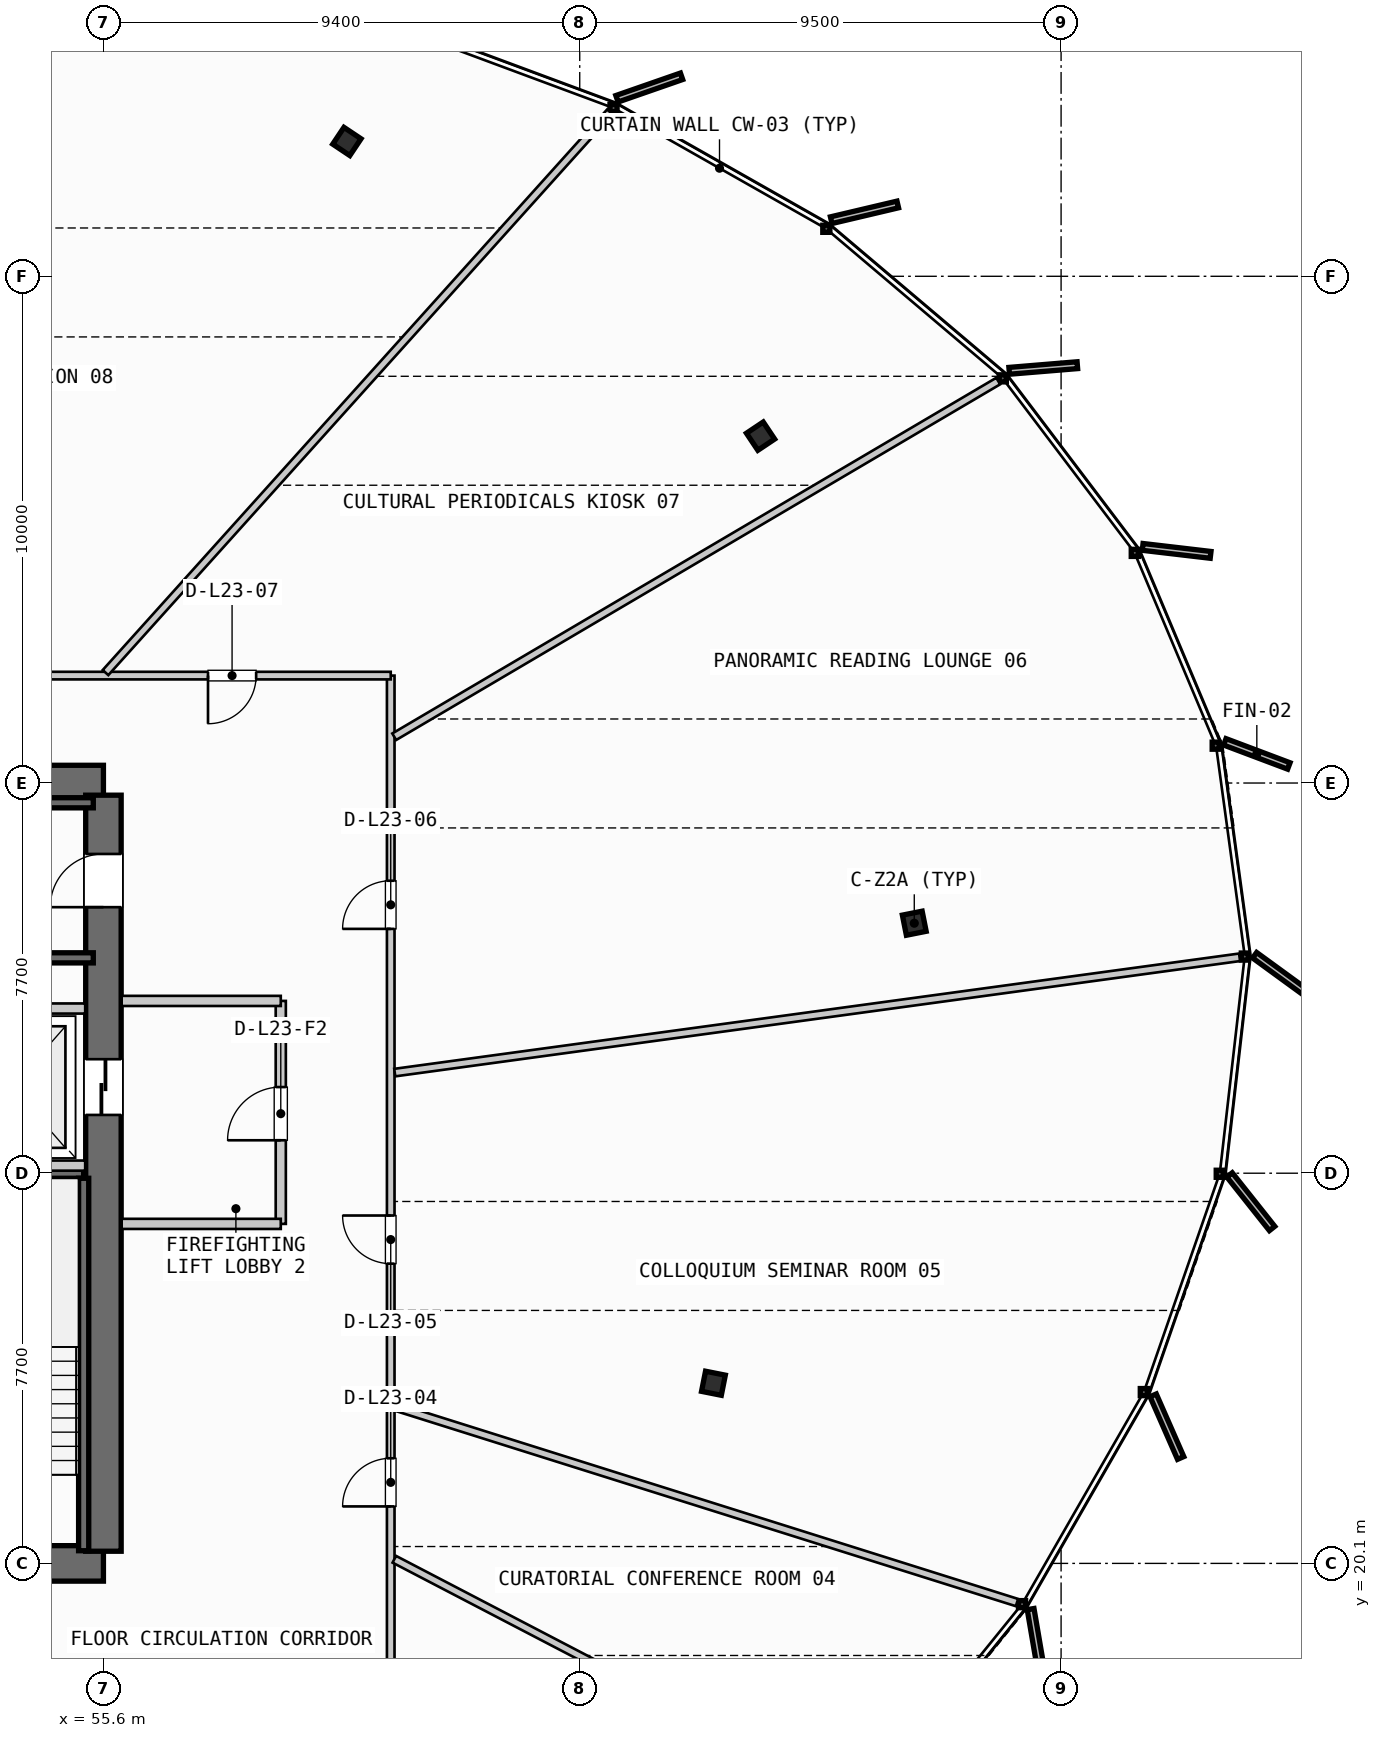
"""IFC4 building model, lengths in metres.
Left out: names, types, materials, properties, quantities, classifications, styles, units other than length and angle.
Written with IfcOpenShell. Run it as: python <this file> out.ifc"""

import sys

from ifc_helpers import new_model, si_unit, direction, frame, frame_2d, origin, origin_2d, place, context, subcontext, project, spatial, rectangle, i_section, extrude, source, transform, mapped, element, fill, save


model = new_model("IFC4")
c1 = context("Model", 3, precision=1e-05, world=origin(), true_north=direction((0.0, 1.0)))
c2 = subcontext(c1, "Body", "Model", "MODEL_VIEW")
j1 = project(units=[si_unit("LENGTHUNIT", "METRE"), si_unit("PLANEANGLEUNIT", "RADIAN")], contexts=[c1])
p1 = place(None, origin())
s1 = spatial("IfcSite", under=j1, at=p1, CompositionType="ELEMENT")
p2 = place(p1, origin())
s2 = spatial("IfcBuilding", under=s1, at=p2, CompositionType="ELEMENT")
p3 = place(p2, frame((0.0, 0.0, 96.4)))
s3 = spatial("IfcBuildingStorey", under=s2, at=p3, CompositionType="ELEMENT", Elevation=96.4)
p4 = place(p3, frame((38.0, 20.1, 0.0), z_axis=(0.0, 0.0, 1.0), x_axis=(1.0, 0.0, 0.0)))
e1 = element("IfcWall", 1, at=p4, inside=s3, PredefinedType="SHEAR", context=c2, shape_type="SweptSolid", body=[
    extrude(rectangle(XDim=17.6, YDim=0.7, at=frame_2d((8.8, 0.0))), origin(), (0.0, 0.0, 1.0), 3.35),
])
p5 = place(p4, frame((1.4, 0.0, 0.0)))
e2 = element("IfcOpeningElement", 2, at=p5, cuts=e1, PredefinedType="OPENING", context=c2, shape_type="SweptSolid", body=[
    extrude(rectangle(XDim=1.05, YDim=2.15, at=frame_2d((0.525, 1.075))), frame((0.0, 0.36, 0.0), z_axis=(0.0, -1.0, 0.0), x_axis=(1.0, 0.0, 0.0)), (0.0, 0.0, 1.0), 0.72),
])
p6 = place(p4, frame((15.15, 0.0, 0.0)))
e3 = element("IfcOpeningElement", 3, at=p6, cuts=e1, PredefinedType="OPENING", context=c2, shape_type="SweptSolid", body=[
    extrude(rectangle(XDim=1.05, YDim=2.15, at=frame_2d((0.525, 1.075))), frame((0.0, 0.36, 0.0), z_axis=(0.0, -1.0, 0.0), x_axis=(1.0, 0.0, 0.0)), (0.0, 0.0, 1.0), 0.72),
])
p7 = place(p3, frame((55.6, 35.5, 0.0), z_axis=(0.0, 0.0, 1.0), x_axis=(-1.0, 0.0, 0.0)))
e4 = element("IfcWall", 4, at=p7, inside=s3, PredefinedType="SHEAR", context=c2, shape_type="SweptSolid", body=[
    extrude(rectangle(XDim=17.6, YDim=0.7, at=frame_2d((8.8, 0.0))), origin(), (0.0, 0.0, 1.0), 3.35),
])
p8 = place(p7, frame((8.05, 0.0, 0.0)))
e5 = element("IfcOpeningElement", 5, at=p8, cuts=e4, PredefinedType="OPENING", context=c2, shape_type="SweptSolid", body=[
    extrude(rectangle(XDim=1.5, YDim=2.2, at=frame_2d((0.75, 1.1))), frame((0.0, 0.36, 0.0), z_axis=(0.0, -1.0, 0.0), x_axis=(1.0, 0.0, 0.0)), (0.0, 0.0, 1.0), 0.72),
])
p9 = place(p7, frame((14.95, 0.0, 0.0)))
e6 = element("IfcOpeningElement", 6, at=p9, cuts=e4, PredefinedType="OPENING", context=c2, shape_type="SweptSolid", body=[
    extrude(rectangle(XDim=1.4, YDim=2.3, at=frame_2d((0.7, 1.15))), frame((0.0, 0.36, 0.0), z_axis=(0.0, -1.0, 0.0), x_axis=(1.0, 0.0, 0.0)), (0.0, 0.0, 1.0), 0.72),
])
p10 = place(p7, frame((12.6, 0.0, 0.0)))
e7 = element("IfcOpeningElement", 7, at=p10, cuts=e4, PredefinedType="OPENING", context=c2, shape_type="SweptSolid", body=[
    extrude(rectangle(XDim=0.95, YDim=2.15, at=frame_2d((0.475, 1.075))), frame((0.0, 0.36, 0.0), z_axis=(0.0, -1.0, 0.0), x_axis=(1.0, 0.0, 0.0)), (0.0, 0.0, 1.0), 0.72),
])
p11 = place(p7, frame((10.45, 0.0, 0.0)))
e8 = element("IfcOpeningElement", 8, at=p11, cuts=e4, PredefinedType="OPENING", context=c2, shape_type="SweptSolid", body=[
    extrude(rectangle(XDim=0.95, YDim=2.15, at=frame_2d((0.475, 1.075))), frame((0.0, 0.36, 0.0), z_axis=(0.0, -1.0, 0.0), x_axis=(1.0, 0.0, 0.0)), (0.0, 0.0, 1.0), 0.72),
])
p12 = place(p3, frame((55.6, 20.34, 0.0), z_axis=(0.0, 0.0, 1.0), x_axis=(0.0, 1.0, 0.0)))
e9 = element("IfcWall", 9, at=p12, inside=s3, PredefinedType="SHEAR", context=c2, shape_type="SweptSolid", body=[
    extrude(rectangle(XDim=14.92, YDim=0.7, at=frame_2d((7.46, 0.0))), origin(), (0.0, 0.0, 1.0), 3.35),
])
p13 = place(p12, frame((12.71, 0.0, 0.0)))
e10 = element("IfcOpeningElement", 10, at=p13, cuts=e9, PredefinedType="OPENING", context=c2, shape_type="SweptSolid", body=[
    extrude(rectangle(XDim=1.05, YDim=2.15, at=frame_2d((0.525, 1.075))), frame((0.0, 0.36, 0.0), z_axis=(0.0, -1.0, 0.0), x_axis=(1.0, 0.0, 0.0)), (0.0, 0.0, 1.0), 0.72),
])
p14 = place(p12, frame((8.61, 0.0, 0.0)))
e11 = element("IfcOpeningElement", 11, at=p14, cuts=e9, PredefinedType="OPENING", context=c2, shape_type="SweptSolid", body=[
    extrude(rectangle(XDim=1.1, YDim=2.2, at=frame_2d((0.55, 1.1))), frame((0.0, 0.36, 0.0), z_axis=(0.0, -1.0, 0.0), x_axis=(1.0, 0.0, 0.0)), (0.0, 0.0, 1.0), 0.72),
])
m1 = source(origin(), c2, "Body", "SweptSolid", [
    extrude(i_section(OverallWidth=0.405, OverallDepth=0.398, WebThickness=0.035, FlangeThickness=0.056, FilletRadius=0.015, at=origin_2d()), origin(), (0.0, 0.0, 1.0), 3.35),
])
for number, where, z_axis, x_axis in (
    (12, (71.603, 32.733, 0.0), (0.0, 0.0, 1.0), (0.981, 0.195, 0.0)),
    (13, (68.569, 42.345, 0.0), (0.0, 0.0, 1.0), (0.831, 0.556, 0.0)),
    (14, (60.405, 48.161, 0.0), (0.0, 0.0, 1.0), (0.556, 0.831, 0.0)),
    (15, (67.639, 23.655, 0.0), (0.0, 0.0, 1.0), (0.981, -0.195, 0.0)),
):
    element("IfcColumn", number, at=place(p3, frame(where, z_axis=z_axis, x_axis=x_axis)), inside=s3, PredefinedType="COLUMN", context=c2, shape_type="MappedRepresentation", body=[
        mapped(m1, transform((0.0, 0.0, 0.0), scale=1.0)),
    ])
p15 = place(p3, frame((52.15, 27.8, 0.0), z_axis=(0.0, 0.0, 1.0), x_axis=(1.0, 0.0, 0.0)))
e16 = element("IfcWall", 16, at=p15, inside=s3, PredefinedType="SHEAR", context=c2, shape_type="SweptSolid", body=[
    extrude(rectangle(XDim=3.06, YDim=0.2, at=frame_2d((1.53, 0.0))), origin(), (0.0, 0.0, 1.0), 3.35),
])
for number, where, z_axis, x_axis in (
    (17, (55.21, 27.7, 0.0), (0.0, 0.0, 1.0), (0.0, -1.0, 0.0)),
    (18, (48.05, 35.11, 0.0), (0.0, 0.0, 1.0), (1.0, 0.0, 0.0)),
    (19, (55.4, 32.05, 0.0), (0.0, 0.0, 1.0), (-1.0, 0.0, 0.0)),
):
    element("IfcWall", number, at=place(p3, frame(where, z_axis=z_axis, x_axis=x_axis)), inside=s3, PredefinedType="SHEAR", context=c2, shape_type="SweptSolid", body=[
        extrude(rectangle(XDim=7.35, YDim=0.2, at=frame_2d((3.675, 0.0))), origin(), (0.0, 0.0, 1.0), 3.35),
    ])
for number, where, z_axis, x_axis in (
    (20, (52.45, 27.95, 0.0), (0.0, 0.0, 1.0), (1.0, 0.0, 0.0)),
    (21, (52.45, 31.05, 0.0), (0.0, 0.0, 1.0), (1.0, 0.0, 0.0)),
):
    element("IfcWall", number, at=place(p3, frame(where, z_axis=z_axis, x_axis=x_axis)), inside=s3, PredefinedType="PARTITIONING", context=c2, shape_type="SweptSolid", body=[
        extrude(rectangle(XDim=2.79, YDim=0.2, at=frame_2d((1.395, 0.0))), origin(), (0.0, 0.0, 1.0), 2.28),
    ])
p16 = place(p3, frame((59.1, 26.8, 0.0), z_axis=(0.0, 0.0, 1.0), x_axis=(0.0, 1.0, 0.0)))
e22 = element("IfcWall", 22, at=p16, inside=s3, PredefinedType="PARTITIONING", context=c2, shape_type="SweptSolid", body=[
    extrude(rectangle(XDim=4.4, YDim=0.2, at=frame_2d((2.2, 0.0))), origin(), (0.0, 0.0, 1.0), 2.28),
])
p17 = place(p16, frame((1.65, 0.0, 0.0)))
e23 = element("IfcOpeningElement", 23, at=p17, cuts=e22, PredefinedType="OPENING", context=c2, shape_type="SweptSolid", body=[
    extrude(rectangle(XDim=1.05, YDim=2.15, at=frame_2d((0.525, 1.075))), frame((0.0, 0.11, 0.0), z_axis=(0.0, -1.0, 0.0), x_axis=(1.0, 0.0, 0.0)), (0.0, 0.0, 1.0), 0.22),
])
for number, where, z_axis, x_axis in (
    (24, (55.96, 26.8, 0.0), (0.0, 0.0, 1.0), (1.0, 0.0, 0.0)),
    (25, (55.96, 31.2, 0.0), (0.0, 0.0, 1.0), (1.0, 0.0, 0.0)),
):
    element("IfcWall", number, at=place(p3, frame(where, z_axis=z_axis, x_axis=x_axis)), inside=s3, PredefinedType="PARTITIONING", context=c2, shape_type="SweptSolid", body=[
        extrude(rectangle(XDim=3.14, YDim=0.2, at=frame_2d((1.57, 0.0))), origin(), (0.0, 0.0, 1.0), 2.28),
    ])
p18 = place(p3, frame((61.27, 17.14, 0.0), z_axis=(0.0, 0.0, 1.0), x_axis=(0.0, 1.0, 0.0)))
e26 = element("IfcWall", 26, at=p18, inside=s3, PredefinedType="PARTITIONING", context=c2, shape_type="SweptSolid", body=[
    extrude(rectangle(XDim=20.48, YDim=0.15, at=frame_2d((10.24, 0.0))), origin(), (0.0, 0.0, 1.0), 2.28),
])
p19 = place(p18, frame((4.084, 0.0, 0.0)))
e27 = element("IfcOpeningElement", 27, at=p19, cuts=e26, PredefinedType="OPENING", context=c2, shape_type="SweptSolid", body=[
    extrude(rectangle(XDim=0.95, YDim=2.15, at=frame_2d((0.475, 1.075))), frame((0.0, 0.085, 0.0), z_axis=(0.0, -1.0, 0.0), x_axis=(1.0, 0.0, 0.0)), (0.0, 0.0, 1.0), 0.17),
])
p20 = place(p18, frame((8.875, 0.0, 0.0)))
e28 = element("IfcOpeningElement", 28, at=p20, cuts=e26, PredefinedType="OPENING", context=c2, shape_type="SweptSolid", body=[
    extrude(rectangle(XDim=0.95, YDim=2.15, at=frame_2d((0.475, 1.075))), frame((0.0, 0.085, 0.0), z_axis=(0.0, -1.0, 0.0), x_axis=(1.0, 0.0, 0.0)), (0.0, 0.0, 1.0), 0.17),
])
p21 = place(p18, frame((15.482, 0.0, 0.0)))
e29 = element("IfcOpeningElement", 29, at=p21, cuts=e26, PredefinedType="OPENING", context=c2, shape_type="SweptSolid", body=[
    extrude(rectangle(XDim=0.95, YDim=2.15, at=frame_2d((0.475, 1.075))), frame((0.0, 0.085, 0.0), z_axis=(0.0, -1.0, 0.0), x_axis=(1.0, 0.0, 0.0)), (0.0, 0.0, 1.0), 0.17),
])
p22 = place(p3, frame((61.27, 37.62, 0.0), z_axis=(0.0, 0.0, 1.0), x_axis=(-1.0, 0.0, 0.0)))
e30 = element("IfcWall", 30, at=p22, inside=s3, PredefinedType="PARTITIONING", context=c2, shape_type="SweptSolid", body=[
    extrude(rectangle(XDim=28.42, YDim=0.15, at=frame_2d((14.21, 0.0))), origin(), (0.0, 0.0, 1.0), 2.28),
])
p23 = place(p22, frame((2.656, 0.0, 0.0)))
e31 = element("IfcOpeningElement", 31, at=p23, cuts=e30, PredefinedType="OPENING", context=c2, shape_type="SweptSolid", body=[
    extrude(rectangle(XDim=0.95, YDim=2.15, at=frame_2d((0.475, 1.075))), frame((0.0, 0.085, 0.0), z_axis=(0.0, -1.0, 0.0), x_axis=(1.0, 0.0, 0.0)), (0.0, 0.0, 1.0), 0.17),
])
p24 = place(p22, frame((9.818, 0.0, 0.0)))
e32 = element("IfcOpeningElement", 32, at=p24, cuts=e30, PredefinedType="OPENING", context=c2, shape_type="SweptSolid", body=[
    extrude(rectangle(XDim=0.95, YDim=2.15, at=frame_2d((0.475, 1.075))), frame((0.0, 0.085, 0.0), z_axis=(0.0, -1.0, 0.0), x_axis=(1.0, 0.0, 0.0)), (0.0, 0.0, 1.0), 0.17),
])
p25 = place(p22, frame((16.826, 0.0, 0.0)))
e33 = element("IfcOpeningElement", 33, at=p25, cuts=e30, PredefinedType="OPENING", context=c2, shape_type="SweptSolid", body=[
    extrude(rectangle(XDim=0.95, YDim=2.15, at=frame_2d((0.475, 1.075))), frame((0.0, 0.085, 0.0), z_axis=(0.0, -1.0, 0.0), x_axis=(1.0, 0.0, 0.0)), (0.0, 0.0, 1.0), 0.17),
])
p26 = place(p22, frame((23.229, 0.0, 0.0)))
e34 = element("IfcOpeningElement", 34, at=p26, cuts=e30, PredefinedType="OPENING", context=c2, shape_type="SweptSolid", body=[
    extrude(rectangle(XDim=0.95, YDim=2.15, at=frame_2d((0.475, 1.075))), frame((0.0, 0.085, 0.0), z_axis=(0.0, -1.0, 0.0), x_axis=(1.0, 0.0, 0.0)), (0.0, 0.0, 1.0), 0.17),
])
p27 = place(p3, frame((61.341, 20.181, 0.0), z_axis=(0.0, 0.0, 1.0), x_axis=(0.886775248426, -0.462200885741, 0.0)))
e35 = element("IfcWall", 35, at=p27, inside=s3, PredefinedType="PARTITIONING", context=c2, shape_type="SweptSolid", body=[
    extrude(rectangle(XDim=10.284, YDim=0.15, at=frame_2d((5.142, 0.0))), origin(), (0.0, 0.0, 1.0), 2.28),
])
p28 = place(p3, frame((61.346, 23.193, 0.0), z_axis=(0.0, 0.0, 1.0), x_axis=(0.953881626894, -0.300183013965, 0.0)))
e36 = element("IfcWall", 36, at=p28, inside=s3, PredefinedType="PARTITIONING", context=c2, shape_type="SweptSolid", body=[
    extrude(rectangle(XDim=12.877, YDim=0.15, at=frame_2d((6.438, 0.0))), origin(), (0.0, 0.0, 1.0), 2.28),
])
p29 = place(p3, frame((61.349, 29.785, 0.0), z_axis=(0.0, 0.0, 1.0), x_axis=(0.990815948539, 0.135217440153, 0.0)))
e37 = element("IfcWall", 37, at=p29, inside=s3, PredefinedType="PARTITIONING", context=c2, shape_type="SweptSolid", body=[
    extrude(rectangle(XDim=16.828, YDim=0.15, at=frame_2d((8.414, 0.0))), origin(), (0.0, 0.0, 1.0), 2.28),
])
p30 = place(p3, frame((61.339, 36.413, 0.0), z_axis=(0.0, 0.0, 1.0), x_axis=(0.861699562592, 0.507418824866, 0.0)))
e38 = element("IfcWall", 38, at=p30, inside=s3, PredefinedType="PARTITIONING", context=c2, shape_type="SweptSolid", body=[
    extrude(rectangle(XDim=13.833, YDim=0.15, at=frame_2d((6.917, 0.0))), origin(), (0.0, 0.0, 1.0), 2.28),
])
p31 = place(p3, frame((55.641, 37.679, 0.0), z_axis=(0.0, 0.0, 1.0), x_axis=(0.668923040801, 0.74333166587, 0.0)))
e39 = element("IfcWall", 39, at=p31, inside=s3, PredefinedType="PARTITIONING", context=c2, shape_type="SweptSolid", body=[
    extrude(rectangle(XDim=14.883, YDim=0.15, at=frame_2d((7.441, 0.0))), origin(), (0.0, 0.0, 1.0), 2.28),
])
m2 = source(origin(), c2, "Body", "SweptSolid", [
    extrude(rectangle(XDim=1.05, YDim=2.15, at=frame_2d((0.525, 1.075))), frame((0.0, 0.025, 0.0), z_axis=(0.0, -1.0, 0.0), x_axis=(1.0, 0.0, 0.0)), (0.0, 0.0, 1.0), 0.05),
])
p32 = place(p13, origin())
e40 = element("IfcDoor", 40, at=p32, inside=s3, OperationType="SINGLE_SWING_LEFT", PredefinedType="DOOR", context=c2, shape_type="MappedRepresentation", body=[
    mapped(m2, transform((0.0, 0.0, 0.0), scale=1.0)),
])
fill(e10, e40)
m3 = source(origin(), c2, "Body", "SweptSolid", [
    extrude(rectangle(XDim=1.1, YDim=2.2, at=frame_2d((0.55, 1.1))), frame((0.0, 0.025, 0.0), z_axis=(0.0, -1.0, 0.0), x_axis=(1.0, 0.0, 0.0)), (0.0, 0.0, 1.0), 0.05),
])
p33 = place(p14, origin())
e41 = element("IfcDoor", 41, at=p33, inside=s3, OperationType="SLIDING_TO_RIGHT", PredefinedType="DOOR", context=c2, shape_type="MappedRepresentation", body=[
    mapped(m3, transform((0.0, 0.0, 0.0), scale=1.0)),
])
fill(e11, e41)
p34 = place(p17, origin())
e42 = element("IfcDoor", 42, at=p34, inside=s3, OperationType="SINGLE_SWING_LEFT", PredefinedType="DOOR", context=c2, shape_type="MappedRepresentation", body=[
    mapped(m2, transform((0.0, 0.0, 0.0), scale=1.0)),
])
fill(e23, e42)
m4 = source(origin(), c2, "Body", "SweptSolid", [
    extrude(rectangle(XDim=0.95, YDim=2.15, at=frame_2d((0.475, 1.075))), frame((0.0, 0.025, 0.0), z_axis=(0.0, -1.0, 0.0), x_axis=(1.0, 0.0, 0.0)), (0.0, 0.0, 1.0), 0.05),
])
p35 = place(p19, origin())
e43 = element("IfcDoor", 43, at=p35, inside=s3, OperationType="SINGLE_SWING_LEFT", PredefinedType="DOOR", context=c2, shape_type="MappedRepresentation", body=[
    mapped(m4, transform((0.0, 0.0, 0.0), scale=1.0)),
])
fill(e27, e43)
p36 = place(p20, origin())
e44 = element("IfcDoor", 44, at=p36, inside=s3, OperationType="SINGLE_SWING_RIGHT", PredefinedType="DOOR", context=c2, shape_type="MappedRepresentation", body=[
    mapped(m4, transform((0.0, 0.0, 0.0), scale=1.0)),
])
fill(e28, e44)
p37 = place(p21, origin())
e45 = element("IfcDoor", 45, at=p37, inside=s3, OperationType="SINGLE_SWING_LEFT", PredefinedType="DOOR", context=c2, shape_type="MappedRepresentation", body=[
    mapped(m4, transform((0.0, 0.0, 0.0), scale=1.0)),
])
fill(e29, e45)
p38 = place(p23, origin())
e46 = element("IfcDoor", 46, at=p38, inside=s3, OperationType="SINGLE_SWING_RIGHT", PredefinedType="DOOR", context=c2, shape_type="MappedRepresentation", body=[
    mapped(m4, transform((0.0, 0.0, 0.0), scale=1.0)),
])
fill(e31, e46)
save(model, sys.argv[1])
